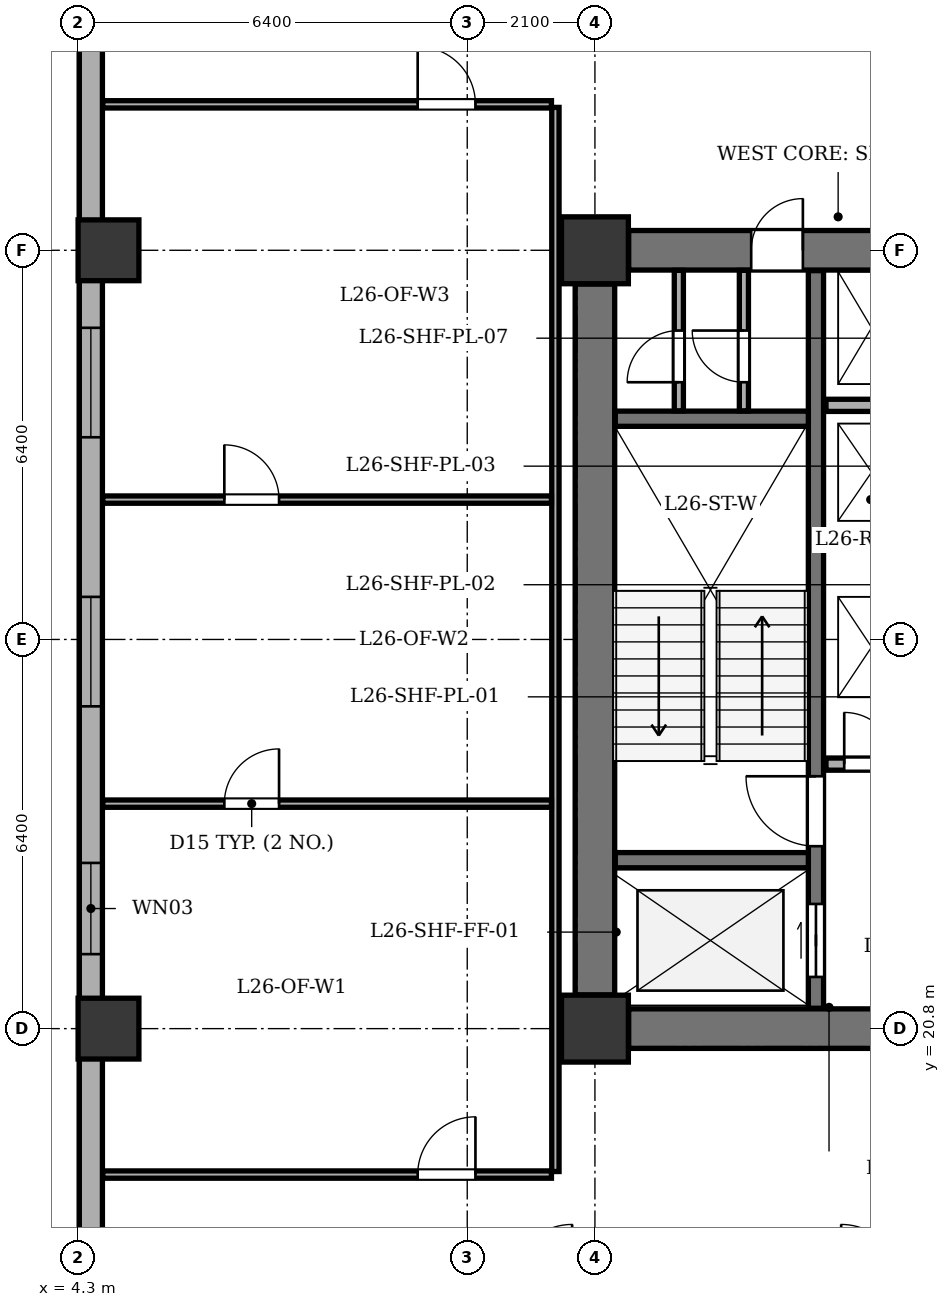
"""IFC4 building model, lengths in metres.
Left out: names, types, materials, properties, quantities, classifications, styles, units other than length and angle.
Written with IfcOpenShell. Run it as: python <this file> out.ifc"""

import sys

from ifc_helpers import new_model, si_unit, direction, frame, frame_2d, origin, origin_2d, place, context, subcontext, project, spatial, rectangle, extrude, element, fill, save


model = new_model("IFC4")
c1 = context("Model", 3, precision=1e-05, world=origin(), true_north=direction((0.0, 1.0)))
c2 = subcontext(c1, "Body", "Model", "MODEL_VIEW")
j1 = project(units=[si_unit("LENGTHUNIT", "METRE"), si_unit("PLANEANGLEUNIT", "RADIAN")], contexts=[c1])
p1 = place(None, origin())
s1 = spatial("IfcSite", under=j1, at=p1, CompositionType="ELEMENT")
p2 = place(p1, origin())
s2 = spatial("IfcBuilding", under=s1, at=p2, CompositionType="ELEMENT")
p3 = place(p2, frame((0.0, 0.0, 106.2)))
s3 = spatial("IfcBuildingStorey", under=s2, at=p3, CompositionType="ELEMENT", Elevation=106.2)
for number, where, z_axis, x_axis in (
    (1, (12.8, 20.8, 0.0), (0.0, 0.0, 1.0), (1.0, 0.0, 0.0)),
    (2, (12.8, 33.6, 0.0), (0.0, 0.0, 1.0), (1.0, 0.0, 0.0)),
):
    element("IfcColumn", number, at=place(p3, frame(where, z_axis=z_axis, x_axis=x_axis)), inside=s3, PredefinedType="COLUMN", context=c2, shape_type="SweptSolid", body=[
        extrude(rectangle(XDim=1.1, YDim=1.1, at=origin_2d()), origin(), (0.0, 0.0, 1.0), 3.9),
    ])
for number, where, z_axis, x_axis in (
    (3, (4.8, 20.8, 0.0), (0.0, 0.0, 1.0), (1.0, 0.0, 0.0)),
    (4, (4.8, 33.6, 0.0), (0.0, 0.0, 1.0), (1.0, 0.0, 0.0)),
):
    element("IfcColumn", number, at=place(p3, frame(where, z_axis=z_axis, x_axis=x_axis)), inside=s3, PredefinedType="COLUMN", context=c2, shape_type="SweptSolid", body=[
        extrude(rectangle(XDim=1.0, YDim=1.0, at=origin_2d()), origin(), (0.0, 0.0, 1.0), 3.9),
    ])
p4 = place(p3, frame((4.51, 12.9, 0.0), z_axis=(0.0, 0.0, 1.0), x_axis=(0.0, 1.0, 0.0)))
e5 = element("IfcWall", 5, at=p4, inside=s3, PredefinedType="STANDARD", context=c2, shape_type="SweptSolid", body=[
    extrude(rectangle(XDim=35.0, YDim=0.38, at=frame_2d((17.5, 0.0))), origin(), (0.0, 0.0, 1.0), 2.985),
])
p5 = place(p4, frame((2.025, 0.0, 0.8)))
e6 = element("IfcOpeningElement", 6, at=p5, cuts=e5, PredefinedType="OPENING", context=c2, shape_type="SweptSolid", body=[
    extrude(rectangle(XDim=1.8, YDim=1.9, at=frame_2d((0.9, 0.95))), frame((0.0, 0.2, 0.0), z_axis=(0.0, -1.0, 0.0), x_axis=(1.0, 0.0, 0.0)), (0.0, 0.0, 1.0), 0.4),
])
p6 = place(p4, frame((9.125, 0.0, 0.8)))
e7 = element("IfcOpeningElement", 7, at=p6, cuts=e5, PredefinedType="OPENING", context=c2, shape_type="SweptSolid", body=[
    extrude(rectangle(XDim=1.5, YDim=1.9, at=frame_2d((0.75, 0.95))), frame((0.0, 0.2, 0.0), z_axis=(0.0, -1.0, 0.0), x_axis=(1.0, 0.0, 0.0)), (0.0, 0.0, 1.0), 0.4),
])
p7 = place(p4, frame((13.2, 0.0, 0.8)))
e8 = element("IfcOpeningElement", 8, at=p7, cuts=e5, PredefinedType="OPENING", context=c2, shape_type="SweptSolid", body=[
    extrude(rectangle(XDim=1.8, YDim=1.9, at=frame_2d((0.9, 0.95))), frame((0.0, 0.2, 0.0), z_axis=(0.0, -1.0, 0.0), x_axis=(1.0, 0.0, 0.0)), (0.0, 0.0, 1.0), 0.4),
])
p8 = place(p4, frame((17.625, 0.0, 0.8)))
e9 = element("IfcOpeningElement", 9, at=p8, cuts=e5, PredefinedType="OPENING", context=c2, shape_type="SweptSolid", body=[
    extrude(rectangle(XDim=1.8, YDim=1.9, at=frame_2d((0.9, 0.95))), frame((0.0, 0.2, 0.0), z_axis=(0.0, -1.0, 0.0), x_axis=(1.0, 0.0, 0.0)), (0.0, 0.0, 1.0), 0.4),
])
p9 = place(p4, frame((25.443, 0.0, 0.8)))
e10 = element("IfcOpeningElement", 10, at=p9, cuts=e5, PredefinedType="OPENING", context=c2, shape_type="SweptSolid", body=[
    extrude(rectangle(XDim=1.8, YDim=1.9, at=frame_2d((0.9, 0.95))), frame((0.0, 0.2, 0.0), z_axis=(0.0, -1.0, 0.0), x_axis=(1.0, 0.0, 0.0)), (0.0, 0.0, 1.0), 0.4),
])
p10 = place(p4, frame((30.207, 0.0, 0.8)))
e11 = element("IfcOpeningElement", 11, at=p10, cuts=e5, PredefinedType="OPENING", context=c2, shape_type="SweptSolid", body=[
    extrude(rectangle(XDim=2.4, YDim=1.9, at=frame_2d((1.2, 0.95))), frame((0.0, 0.2, 0.0), z_axis=(0.0, -1.0, 0.0), x_axis=(1.0, 0.0, 0.0)), (0.0, 0.0, 1.0), 0.4),
])
p11 = place(p3, frame((12.8, 21.355, 0.0), z_axis=(0.0, 0.0, 1.0), x_axis=(0.0, 1.0, 0.0)))
e12 = element("IfcWall", 12, at=p11, inside=s3, PredefinedType="SHEAR", context=c2, shape_type="SweptSolid", body=[
    extrude(rectangle(XDim=11.69, YDim=0.65, at=frame_2d((5.845, 0.0))), origin(), (0.0, 0.0, 1.0), 3.45),
])
p12 = place(p3, frame((13.355, 20.8, 0.0), z_axis=(0.0, 0.0, 1.0), x_axis=(1.0, 0.0, 0.0)))
e13 = element("IfcWall", 13, at=p12, inside=s3, PredefinedType="SHEAR", context=c2, shape_type="SweptSolid", body=[
    extrude(rectangle(XDim=6.89, YDim=0.65, at=frame_2d((3.445, 0.0))), origin(), (0.0, 0.0, 1.0), 3.45),
])
p13 = place(p3, frame((13.355, 33.6, 0.0), z_axis=(0.0, 0.0, 1.0), x_axis=(1.0, 0.0, 0.0)))
e14 = element("IfcWall", 14, at=p13, inside=s3, PredefinedType="SHEAR", context=c2, shape_type="SweptSolid", body=[
    extrude(rectangle(XDim=6.89, YDim=0.65, at=frame_2d((3.445, 0.0))), origin(), (0.0, 0.0, 1.0), 3.45),
])
p14 = place(p13, frame((2.015, 0.0, 0.0)))
e15 = element("IfcOpeningElement", 15, at=p14, cuts=e14, PredefinedType="OPENING", context=c2, shape_type="SweptSolid", body=[
    extrude(rectangle(XDim=0.85, YDim=2.02, at=frame_2d((0.425, 1.01))), frame((0.0, 0.335, 0.0), z_axis=(0.0, -1.0, 0.0), x_axis=(1.0, 0.0, 0.0)), (0.0, 0.0, 1.0), 0.67),
])
p15 = place(p3, frame((16.435, 21.135, 0.0), z_axis=(0.0, 0.0, 1.0), x_axis=(0.0, 1.0, 0.0)))
e16 = element("IfcWall", 16, at=p15, inside=s3, PredefinedType="SHEAR", context=c2, shape_type="SweptSolid", body=[
    extrude(rectangle(XDim=12.13, YDim=0.25, at=frame_2d((6.065, 0.0))), origin(), (0.0, 0.0, 1.0), 3.45),
])
p16 = place(p15, frame((0.515, 0.0, 0.0)))
e17 = element("IfcOpeningElement", 17, at=p16, cuts=e16, PredefinedType="OPENING", context=c2, shape_type="SweptSolid", body=[
    extrude(rectangle(XDim=1.2, YDim=2.15, at=frame_2d((0.6, 1.075))), frame((0.0, 0.135, 0.0), z_axis=(0.0, -1.0, 0.0), x_axis=(1.0, 0.0, 0.0)), (0.0, 0.0, 1.0), 0.27),
])
p17 = place(p15, frame((2.665, 0.0, 0.0)))
e18 = element("IfcOpeningElement", 18, at=p17, cuts=e16, PredefinedType="OPENING", context=c2, shape_type="SweptSolid", body=[
    extrude(rectangle(XDim=1.15, YDim=2.15, at=frame_2d((0.575, 1.075))), frame((0.0, 0.135, 0.0), z_axis=(0.0, -1.0, 0.0), x_axis=(1.0, 0.0, 0.0)), (0.0, 0.0, 1.0), 0.27),
])
for number, where, z_axis, x_axis in (
    (19, (13.135, 23.57, 0.0), (0.0, 0.0, 1.0), (1.0, 0.0, 0.0)),
    (20, (13.135, 30.83, 0.0), (0.0, 0.0, 1.0), (1.0, 0.0, 0.0)),
):
    element("IfcWall", number, at=place(p3, frame(where, z_axis=z_axis, x_axis=x_axis)), inside=s3, PredefinedType="SHEAR", context=c2, shape_type="SweptSolid", body=[
        extrude(rectangle(XDim=3.175, YDim=0.25, at=frame_2d((1.587, 0.0))), origin(), (0.0, 0.0, 1.0), 3.45),
    ])
p18 = place(p3, frame((16.6, 25.15, 0.0), z_axis=(0.0, 0.0, 1.0), x_axis=(1.0, 0.0, 0.0)))
e21 = element("IfcWall", 21, at=p18, inside=s3, PredefinedType="SOLIDWALL", context=c2, shape_type="SweptSolid", body=[
    extrude(rectangle(XDim=3.865, YDim=0.2, at=frame_2d((1.933, 0.0))), origin(), (0.0, 0.0, 1.0), 3.45),
])
p19 = place(p18, frame((0.3, 0.0, 0.0)))
e22 = element("IfcOpeningElement", 22, at=p19, cuts=e21, PredefinedType="OPENING", context=c2, shape_type="SweptSolid", body=[
    extrude(rectangle(XDim=0.85, YDim=2.02, at=frame_2d((0.425, 1.01))), frame((0.0, 0.11, 0.0), z_axis=(0.0, -1.0, 0.0), x_axis=(1.0, 0.0, 0.0)), (0.0, 0.0, 1.0), 0.22),
])
p20 = place(p3, frame((16.6, 31.05, 0.0), z_axis=(0.0, 0.0, 1.0), x_axis=(1.0, 0.0, 0.0)))
e23 = element("IfcWall", 23, at=p20, inside=s3, PredefinedType="SOLIDWALL", context=c2, shape_type="SweptSolid", body=[
    extrude(rectangle(XDim=3.85, YDim=0.2, at=frame_2d((1.925, 0.0))), origin(), (0.0, 0.0, 1.0), 3.45),
])
p21 = place(p3, frame((14.18, 30.96, 0.0), z_axis=(0.0, 0.0, 1.0), x_axis=(0.0, 1.0, 0.0)))
e24 = element("IfcWall", 24, at=p21, inside=s3, PredefinedType="PARTITIONING", context=c2, shape_type="SweptSolid", body=[
    extrude(rectangle(XDim=2.31, YDim=0.15, at=frame_2d((1.155, 0.0))), origin(), (0.0, 0.0, 1.0), 3.45),
])
p22 = place(p21, frame((0.47, 0.0, 0.0)))
e25 = element("IfcOpeningElement", 25, at=p22, cuts=e24, PredefinedType="OPENING", context=c2, shape_type="SweptSolid", body=[
    extrude(rectangle(XDim=0.85, YDim=2.02, at=frame_2d((0.425, 1.01))), frame((0.0, 0.085, 0.0), z_axis=(0.0, -1.0, 0.0), x_axis=(1.0, 0.0, 0.0)), (0.0, 0.0, 1.0), 0.17),
])
p23 = place(p3, frame((15.25, 30.96, 0.0), z_axis=(0.0, 0.0, 1.0), x_axis=(0.0, 1.0, 0.0)))
e26 = element("IfcWall", 26, at=p23, inside=s3, PredefinedType="PARTITIONING", context=c2, shape_type="SweptSolid", body=[
    extrude(rectangle(XDim=2.31, YDim=0.15, at=frame_2d((1.155, 0.0))), origin(), (0.0, 0.0, 1.0), 3.45),
])
p24 = place(p23, frame((0.47, 0.0, 0.0)))
e27 = element("IfcOpeningElement", 27, at=p24, cuts=e26, PredefinedType="OPENING", context=c2, shape_type="SweptSolid", body=[
    extrude(rectangle(XDim=0.85, YDim=2.02, at=frame_2d((0.425, 1.01))), frame((0.0, 0.085, 0.0), z_axis=(0.0, -1.0, 0.0), x_axis=(1.0, 0.0, 0.0)), (0.0, 0.0, 1.0), 0.17),
])
p25 = place(p3, frame((12.15, 18.45, 0.0), z_axis=(0.0, 0.0, 1.0), x_axis=(0.0, 1.0, 0.0)))
e28 = element("IfcWall", 28, at=p25, inside=s3, PredefinedType="PARTITIONING", context=c2, shape_type="SweptSolid", body=[
    extrude(rectangle(XDim=17.5, YDim=0.12, at=frame_2d((8.75, 0.0))), origin(), (0.0, 0.0, 1.0), 3.45),
])
p26 = place(p3, frame((4.705, 18.4, 0.0), z_axis=(0.0, 0.0, 1.0), x_axis=(1.0, 0.0, 0.0)))
e29 = element("IfcWall", 29, at=p26, inside=s3, PredefinedType="PARTITIONING", context=c2, shape_type="SweptSolid", body=[
    extrude(rectangle(XDim=7.38, YDim=0.12, at=frame_2d((3.69, 0.0))), origin(), (0.0, 0.0, 1.0), 3.45),
])
p27 = place(p26, frame((5.18, 0.0, 0.0)))
e30 = element("IfcOpeningElement", 30, at=p27, cuts=e29, PredefinedType="OPENING", context=c2, shape_type="SweptSolid", body=[
    extrude(rectangle(XDim=0.95, YDim=2.1, at=frame_2d((0.475, 1.05))), frame((0.0, 0.07, 0.0), z_axis=(0.0, -1.0, 0.0), x_axis=(1.0, 0.0, 0.0)), (0.0, 0.0, 1.0), 0.14),
])
p28 = place(p3, frame((4.705, 36.0, 0.0), z_axis=(0.0, 0.0, 1.0), x_axis=(1.0, 0.0, 0.0)))
e31 = element("IfcWall", 31, at=p28, inside=s3, PredefinedType="PARTITIONING", context=c2, shape_type="SweptSolid", body=[
    extrude(rectangle(XDim=7.38, YDim=0.12, at=frame_2d((3.69, 0.0))), origin(), (0.0, 0.0, 1.0), 3.45),
])
p29 = place(p28, frame((5.18, 0.0, 0.0)))
e32 = element("IfcOpeningElement", 32, at=p29, cuts=e31, PredefinedType="OPENING", context=c2, shape_type="SweptSolid", body=[
    extrude(rectangle(XDim=0.95, YDim=2.1, at=frame_2d((0.475, 1.05))), frame((0.0, 0.07, 0.0), z_axis=(0.0, -1.0, 0.0), x_axis=(1.0, 0.0, 0.0)), (0.0, 0.0, 1.0), 0.14),
])
p30 = place(p3, frame((4.705, 24.5, 0.0), z_axis=(0.0, 0.0, 1.0), x_axis=(1.0, 0.0, 0.0)))
e33 = element("IfcWall", 33, at=p30, inside=s3, PredefinedType="PARTITIONING", context=c2, shape_type="SweptSolid", body=[
    extrude(rectangle(XDim=7.38, YDim=0.12, at=frame_2d((3.69, 0.0))), origin(), (0.0, 0.0, 1.0), 3.45),
])
p31 = place(p30, frame((2.0, 0.0, 0.0)))
e34 = element("IfcOpeningElement", 34, at=p31, cuts=e33, PredefinedType="OPENING", context=c2, shape_type="SweptSolid", body=[
    extrude(rectangle(XDim=0.9, YDim=2.05, at=frame_2d((0.45, 1.025))), frame((0.0, 0.07, 0.0), z_axis=(0.0, -1.0, 0.0), x_axis=(1.0, 0.0, 0.0)), (0.0, 0.0, 1.0), 0.14),
])
p32 = place(p3, frame((4.705, 29.5, 0.0), z_axis=(0.0, 0.0, 1.0), x_axis=(1.0, 0.0, 0.0)))
e35 = element("IfcWall", 35, at=p32, inside=s3, PredefinedType="PARTITIONING", context=c2, shape_type="SweptSolid", body=[
    extrude(rectangle(XDim=7.38, YDim=0.12, at=frame_2d((3.69, 0.0))), origin(), (0.0, 0.0, 1.0), 3.45),
])
p33 = place(p32, frame((2.0, 0.0, 0.0)))
e36 = element("IfcOpeningElement", 36, at=p33, cuts=e35, PredefinedType="OPENING", context=c2, shape_type="SweptSolid", body=[
    extrude(rectangle(XDim=0.9, YDim=2.05, at=frame_2d((0.45, 1.025))), frame((0.0, 0.07, 0.0), z_axis=(0.0, -1.0, 0.0), x_axis=(1.0, 0.0, 0.0)), (0.0, 0.0, 1.0), 0.14),
])
p34 = place(p6, origin())
e37 = element("IfcWindow", 37, at=p34, inside=s3, PartitioningType="SINGLE_PANEL", PredefinedType="WINDOW", context=c2, shape_type="SweptSolid", body=[
    extrude(rectangle(XDim=1.5, YDim=1.9, at=frame_2d((0.75, 0.95))), frame((0.0, -0.01, 0.0), z_axis=(0.0, -1.0, 0.0), x_axis=(1.0, 0.0, 0.0)), (0.0, 0.0, 1.0), 0.06),
])
fill(e7, e37)
p35 = place(p7, origin())
e38 = element("IfcWindow", 38, at=p35, inside=s3, PartitioningType="SINGLE_PANEL", PredefinedType="WINDOW", context=c2, shape_type="SweptSolid", body=[
    extrude(rectangle(XDim=1.8, YDim=1.9, at=frame_2d((0.9, 0.95))), frame((0.0, -0.01, 0.0), z_axis=(0.0, -1.0, 0.0), x_axis=(1.0, 0.0, 0.0)), (0.0, 0.0, 1.0), 0.06),
])
fill(e8, e38)
p36 = place(p8, origin())
e39 = element("IfcWindow", 39, at=p36, inside=s3, PartitioningType="SINGLE_PANEL", PredefinedType="WINDOW", context=c2, shape_type="SweptSolid", body=[
    extrude(rectangle(XDim=1.8, YDim=1.9, at=frame_2d((0.9, 0.95))), frame((0.0, -0.01, 0.0), z_axis=(0.0, -1.0, 0.0), x_axis=(1.0, 0.0, 0.0)), (0.0, 0.0, 1.0), 0.06),
])
fill(e9, e39)
p37 = place(p14, origin())
e40 = element("IfcDoor", 40, at=p37, inside=s3, OperationType="SINGLE_SWING_RIGHT", PredefinedType="DOOR", context=c2, shape_type="SweptSolid", body=[
    extrude(rectangle(XDim=0.85, YDim=2.02, at=frame_2d((0.425, 1.01))), frame((0.0, 0.025, 0.0), z_axis=(0.0, -1.0, 0.0), x_axis=(1.0, 0.0, 0.0)), (0.0, 0.0, 1.0), 0.05),
])
fill(e15, e40)
p38 = place(p16, origin())
e41 = element("IfcDoor", 41, at=p38, inside=s3, OperationType="DOUBLE_DOOR_SLIDING", PredefinedType="DOOR", context=c2, shape_type="SweptSolid", body=[
    extrude(rectangle(XDim=1.2, YDim=2.15, at=frame_2d((0.6, 1.075))), frame((0.0, 0.025, 0.0), z_axis=(0.0, -1.0, 0.0), x_axis=(1.0, 0.0, 0.0)), (0.0, 0.0, 1.0), 0.05),
])
fill(e17, e41)
p39 = place(p17, origin())
e42 = element("IfcDoor", 42, at=p39, inside=s3, OperationType="SINGLE_SWING_RIGHT", PredefinedType="DOOR", context=c2, shape_type="SweptSolid", body=[
    extrude(rectangle(XDim=1.15, YDim=2.15, at=frame_2d((0.575, 1.075))), frame((0.0, 0.025, 0.0), z_axis=(0.0, -1.0, 0.0), x_axis=(1.0, 0.0, 0.0)), (0.0, 0.0, 1.0), 0.05),
])
fill(e18, e42)
p40 = place(p19, origin())
e43 = element("IfcDoor", 43, at=p40, inside=s3, OperationType="SINGLE_SWING_LEFT", PredefinedType="DOOR", context=c2, shape_type="SweptSolid", body=[
    extrude(rectangle(XDim=0.85, YDim=2.02, at=frame_2d((0.425, 1.01))), frame((0.0, 0.025, 0.0), z_axis=(0.0, -1.0, 0.0), x_axis=(1.0, 0.0, 0.0)), (0.0, 0.0, 1.0), 0.05),
])
fill(e22, e43)
p41 = place(p22, origin())
e44 = element("IfcDoor", 44, at=p41, inside=s3, OperationType="SINGLE_SWING_LEFT", PredefinedType="DOOR", context=c2, shape_type="SweptSolid", body=[
    extrude(rectangle(XDim=0.85, YDim=2.02, at=frame_2d((0.425, 1.01))), frame((0.0, 0.025, 0.0), z_axis=(0.0, -1.0, 0.0), x_axis=(1.0, 0.0, 0.0)), (0.0, 0.0, 1.0), 0.05),
])
fill(e25, e44)
p42 = place(p24, origin())
e45 = element("IfcDoor", 45, at=p42, inside=s3, OperationType="SINGLE_SWING_RIGHT", PredefinedType="DOOR", context=c2, shape_type="SweptSolid", body=[
    extrude(rectangle(XDim=0.85, YDim=2.02, at=frame_2d((0.425, 1.01))), frame((0.0, 0.025, 0.0), z_axis=(0.0, -1.0, 0.0), x_axis=(1.0, 0.0, 0.0)), (0.0, 0.0, 1.0), 0.05),
])
fill(e27, e45)
p43 = place(p31, origin())
e46 = element("IfcDoor", 46, at=p43, inside=s3, OperationType="SINGLE_SWING_RIGHT", PredefinedType="DOOR", context=c2, shape_type="SweptSolid", body=[
    extrude(rectangle(XDim=0.9, YDim=2.05, at=frame_2d((0.45, 1.025))), frame((0.0, 0.025, 0.0), z_axis=(0.0, -1.0, 0.0), x_axis=(1.0, 0.0, 0.0)), (0.0, 0.0, 1.0), 0.05),
])
fill(e34, e46)
p44 = place(p33, origin())
e47 = element("IfcDoor", 47, at=p44, inside=s3, OperationType="SINGLE_SWING_LEFT", PredefinedType="DOOR", context=c2, shape_type="SweptSolid", body=[
    extrude(rectangle(XDim=0.9, YDim=2.05, at=frame_2d((0.45, 1.025))), frame((0.0, 0.025, 0.0), z_axis=(0.0, -1.0, 0.0), x_axis=(1.0, 0.0, 0.0)), (0.0, 0.0, 1.0), 0.05),
])
fill(e36, e47)
p45 = place(p27, origin())
e48 = element("IfcDoor", 48, at=p45, inside=s3, OperationType="SINGLE_SWING_RIGHT", PredefinedType="DOOR", context=c2, shape_type="SweptSolid", body=[
    extrude(rectangle(XDim=0.95, YDim=2.1, at=frame_2d((0.475, 1.05))), frame((0.0, 0.025, 0.0), z_axis=(0.0, -1.0, 0.0), x_axis=(1.0, 0.0, 0.0)), (0.0, 0.0, 1.0), 0.05),
])
fill(e30, e48)
p46 = place(p29, origin())
e49 = element("IfcDoor", 49, at=p46, inside=s3, OperationType="SINGLE_SWING_LEFT", PredefinedType="DOOR", context=c2, shape_type="SweptSolid", body=[
    extrude(rectangle(XDim=0.95, YDim=2.1, at=frame_2d((0.475, 1.05))), frame((0.0, 0.025, 0.0), z_axis=(0.0, -1.0, 0.0), x_axis=(1.0, 0.0, 0.0)), (0.0, 0.0, 1.0), 0.05),
])
fill(e32, e49)
save(model, sys.argv[1])
